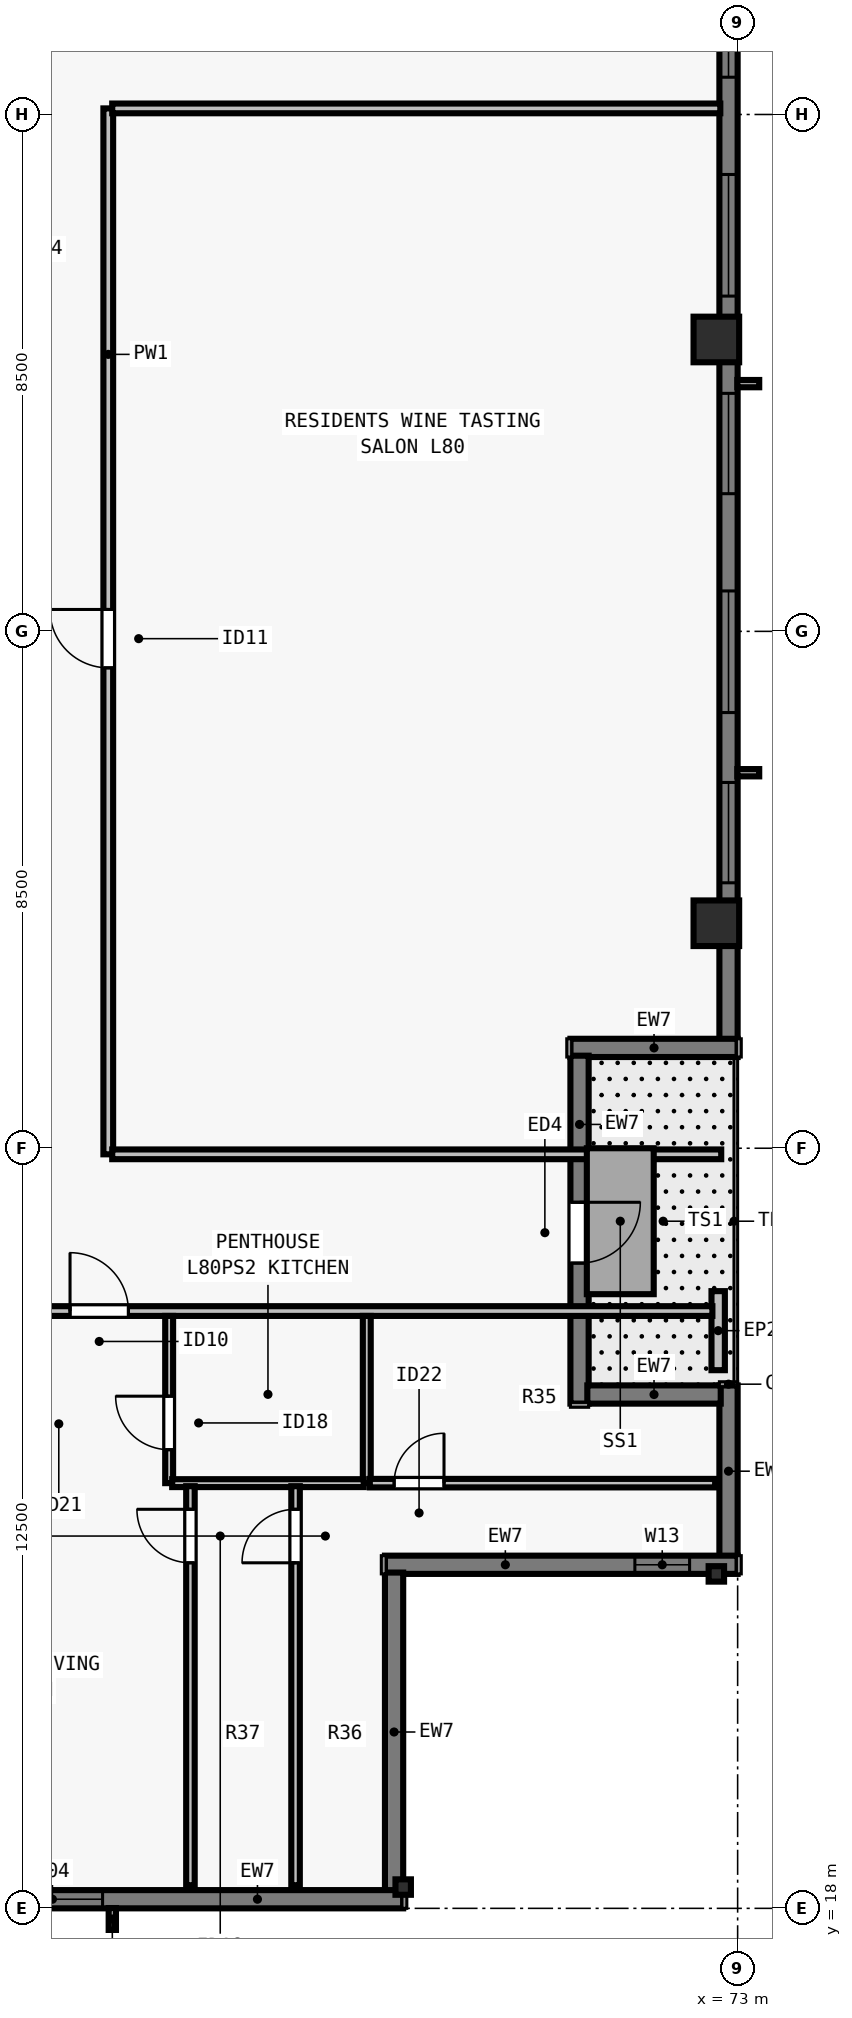
"""IFC4 building model, lengths in metres.
Left out: names, types, materials, properties, quantities, classifications, styles, units other than length and angle.
Written with IfcOpenShell. Run it as: python <this file> out.ifc"""

import sys

from ifc_helpers import new_model, si_unit, direction, frame, frame_2d, origin, origin_2d, place, context, subcontext, project, spatial, rectangle, i_section, extrude, element, fill, save


model = new_model("IFC4")
c1 = context("Model", 3, precision=1e-05, world=origin(), true_north=direction((0.0, 1.0)))
c2 = subcontext(c1, "Body", "Model", "MODEL_VIEW")
j1 = project(units=[si_unit("LENGTHUNIT", "METRE"), si_unit("PLANEANGLEUNIT", "RADIAN")], contexts=[c1])
p1 = place(None, origin())
s1 = spatial("IfcSite", under=j1, at=p1, CompositionType="ELEMENT")
p2 = place(p1, origin())
s2 = spatial("IfcBuilding", under=s1, at=p2, CompositionType="ELEMENT")
p3 = place(p2, frame((0.0, 0.0, 291.0)))
s3 = spatial("IfcBuildingStorey", under=s2, at=p3, CompositionType="ELEMENT", Elevation=291.0)
for number, where, z_axis, x_axis in (
    (1, (67.5, 18.35, 0.0), (0.0, 0.0, 1.0), (1.0, 0.0, 0.0)),
    (2, (72.65, 23.5, 0.0), (0.0, 0.0, 1.0), (0.0, 1.0, 0.0)),
):
    element("IfcColumn", number, at=place(p3, frame(where, z_axis=z_axis, x_axis=x_axis)), inside=s3, PredefinedType="COLUMN", context=c2, shape_type="SweptSolid", body=[
        extrude(i_section(OverallWidth=0.254, OverallDepth=0.254, WebThickness=0.009, FlangeThickness=0.014, FilletRadius=0.013, at=origin_2d()), origin(), (0.0, 0.0, 1.0), 3.5),
    ])
for number, where, z_axis, x_axis in (
    (3, (72.65, 34.2, 0.0), (0.0, 0.0, 1.0), (0.0, 1.0, 0.0)),
    (4, (72.65, 43.8, 0.0), (0.0, 0.0, 1.0), (0.0, 1.0, 0.0)),
):
    element("IfcColumn", number, at=place(p3, frame(where, z_axis=z_axis, x_axis=x_axis)), inside=s3, PredefinedType="COLUMN", context=c2, shape_type="SweptSolid", body=[
        extrude(rectangle(XDim=0.75, YDim=0.75, at=origin_2d()), origin(), (0.0, 0.0, 1.0), 3.5),
    ])
p4 = place(p3, frame((72.85, 26.6, 0.0), z_axis=(0.0, 0.0, 1.0), x_axis=(0.0, -1.0, 0.0)))
e5 = element("IfcWall", 5, at=p4, inside=s3, PredefinedType="SOLIDWALL", context=c2, shape_type="SweptSolid", body=[
    extrude(rectangle(XDim=2.822, YDim=0.3, at=frame_2d((1.411, 0.0))), origin(), (0.0, 0.0, 1.0), 3.29),
])
p5 = place(p3, frame((73.0, 23.65, 0.0), z_axis=(0.0, 0.0, 1.0), x_axis=(-1.0, 0.0, 0.0)))
e6 = element("IfcWall", 6, at=p5, inside=s3, PredefinedType="SOLIDWALL", context=c2, shape_type="SweptSolid", body=[
    extrude(rectangle(XDim=5.8, YDim=0.3, at=frame_2d((2.9, 0.0))), origin(), (0.0, 0.0, 1.0), 3.29),
])
p6 = place(p5, frame((0.79, 0.0, 0.8)))
e7 = element("IfcOpeningElement", 7, at=p6, cuts=e6, PredefinedType="OPENING", context=c2, shape_type="SweptSolid", body=[
    extrude(rectangle(XDim=0.9, YDim=1.75, at=frame_2d((0.45, 0.875))), frame((0.0, 0.16, 0.0), z_axis=(0.0, -1.0, 0.0), x_axis=(1.0, 0.0, 0.0)), (0.0, 0.0, 1.0), 0.32),
])
p7 = place(p3, frame((67.35, 23.522, 0.0), z_axis=(0.0, 0.0, 1.0), x_axis=(0.0, -1.0, 0.0)))
e8 = element("IfcWall", 8, at=p7, inside=s3, PredefinedType="SOLIDWALL", context=c2, shape_type="SweptSolid", body=[
    extrude(rectangle(XDim=5.244, YDim=0.3, at=frame_2d((2.622, 0.0))), origin(), (0.0, 0.0, 1.0), 3.29),
])
p8 = place(p3, frame((67.5, 18.15, 0.0), z_axis=(0.0, 0.0, 1.0), x_axis=(-1.0, 0.0, 0.0)))
e9 = element("IfcWall", 9, at=p8, inside=s3, PredefinedType="SOLIDWALL", context=c2, shape_type="SweptSolid", body=[
    extrude(rectangle(XDim=30.722, YDim=0.3, at=frame_2d((15.361, 0.0))), origin(), (0.0, 0.0, 1.0), 3.29),
])
p9 = place(p8, frame((4.944, 0.0, 0.8)))
e10 = element("IfcOpeningElement", 10, at=p9, cuts=e9, PredefinedType="OPENING", context=c2, shape_type="SweptSolid", body=[
    extrude(rectangle(XDim=1.65, YDim=1.758, at=frame_2d((0.825, 0.879))), frame((0.0, 0.16, 0.0), z_axis=(0.0, -1.0, 0.0), x_axis=(1.0, 0.0, 0.0)), (0.0, 0.0, 1.0), 0.32),
])
p10 = place(p8, frame((7.756, 0.0, 0.8)))
e11 = element("IfcOpeningElement", 11, at=p10, cuts=e9, PredefinedType="OPENING", context=c2, shape_type="SweptSolid", body=[
    extrude(rectangle(XDim=2.0, YDim=1.758, at=frame_2d((1.0, 0.879))), frame((0.0, 0.16, 0.0), z_axis=(0.0, -1.0, 0.0), x_axis=(1.0, 0.0, 0.0)), (0.0, 0.0, 1.0), 0.32),
])
p11 = place(p8, frame((12.617, 0.0, 0.8)))
e12 = element("IfcOpeningElement", 12, at=p11, cuts=e9, PredefinedType="OPENING", context=c2, shape_type="SweptSolid", body=[
    extrude(rectangle(XDim=1.65, YDim=1.758, at=frame_2d((0.825, 0.879))), frame((0.0, 0.16, 0.0), z_axis=(0.0, -1.0, 0.0), x_axis=(1.0, 0.0, 0.0)), (0.0, 0.0, 1.0), 0.32),
])
p12 = place(p8, frame((16.28, 0.0, 0.8)))
e13 = element("IfcOpeningElement", 13, at=p12, cuts=e9, PredefinedType="OPENING", context=c2, shape_type="SweptSolid", body=[
    extrude(rectangle(XDim=2.0, YDim=1.758, at=frame_2d((1.0, 0.879))), frame((0.0, 0.16, 0.0), z_axis=(0.0, -1.0, 0.0), x_axis=(1.0, 0.0, 0.0)), (0.0, 0.0, 1.0), 0.32),
])
p13 = place(p8, frame((21.142, 0.0, 0.8)))
e14 = element("IfcOpeningElement", 14, at=p13, cuts=e9, PredefinedType="OPENING", context=c2, shape_type="SweptSolid", body=[
    extrude(rectangle(XDim=1.65, YDim=1.758, at=frame_2d((0.825, 0.879))), frame((0.0, 0.16, 0.0), z_axis=(0.0, -1.0, 0.0), x_axis=(1.0, 0.0, 0.0)), (0.0, 0.0, 1.0), 0.32),
])
p14 = place(p8, frame((23.954, 0.0, 0.8)))
e15 = element("IfcOpeningElement", 15, at=p14, cuts=e9, PredefinedType="OPENING", context=c2, shape_type="SweptSolid", body=[
    extrude(rectangle(XDim=2.0, YDim=1.758, at=frame_2d((1.0, 0.879))), frame((0.0, 0.16, 0.0), z_axis=(0.0, -1.0, 0.0), x_axis=(1.0, 0.0, 0.0)), (0.0, 0.0, 1.0), 0.32),
])
p15 = place(p3, frame((72.85, 54.5, 0.0), z_axis=(0.0, 0.0, 1.0), x_axis=(0.0, -1.0, 0.0)))
e16 = element("IfcWall", 16, at=p15, inside=s3, PredefinedType="SOLIDWALL", context=c2, shape_type="SweptSolid", body=[
    extrude(rectangle(XDim=22.222, YDim=0.3, at=frame_2d((11.111, 0.0))), origin(), (0.0, 0.0, 1.0), 3.29),
])
p16 = place(p15, frame((4.737, 0.0, 0.8)))
e17 = element("IfcOpeningElement", 17, at=p16, cuts=e16, PredefinedType="OPENING", context=c2, shape_type="SweptSolid", body=[
    extrude(rectangle(XDim=1.65, YDim=1.758, at=frame_2d((0.825, 0.879))), frame((0.0, 0.16, 0.0), z_axis=(0.0, -1.0, 0.0), x_axis=(1.0, 0.0, 0.0)), (0.0, 0.0, 1.0), 0.32),
])
p17 = place(p15, frame((7.987, 0.0, 0.8)))
e18 = element("IfcOpeningElement", 18, at=p17, cuts=e16, PredefinedType="OPENING", context=c2, shape_type="SweptSolid", body=[
    extrude(rectangle(XDim=2.0, YDim=1.758, at=frame_2d((1.0, 0.879))), frame((0.0, 0.16, 0.0), z_axis=(0.0, -1.0, 0.0), x_axis=(1.0, 0.0, 0.0)), (0.0, 0.0, 1.0), 0.32),
])
p18 = place(p15, frame((11.586, 0.0, 0.8)))
e19 = element("IfcOpeningElement", 19, at=p18, cuts=e16, PredefinedType="OPENING", context=c2, shape_type="SweptSolid", body=[
    extrude(rectangle(XDim=1.65, YDim=1.758, at=frame_2d((0.825, 0.879))), frame((0.0, 0.16, 0.0), z_axis=(0.0, -1.0, 0.0), x_axis=(1.0, 0.0, 0.0)), (0.0, 0.0, 1.0), 0.32),
])
p19 = place(p15, frame((14.835, 0.0, 0.8)))
e20 = element("IfcOpeningElement", 20, at=p19, cuts=e16, PredefinedType="OPENING", context=c2, shape_type="SweptSolid", body=[
    extrude(rectangle(XDim=2.0, YDim=1.758, at=frame_2d((1.0, 0.879))), frame((0.0, 0.16, 0.0), z_axis=(0.0, -1.0, 0.0), x_axis=(1.0, 0.0, 0.0)), (0.0, 0.0, 1.0), 0.32),
])
p20 = place(p15, frame((17.985, 0.0, 0.8)))
e21 = element("IfcOpeningElement", 21, at=p20, cuts=e16, PredefinedType="OPENING", context=c2, shape_type="SweptSolid", body=[
    extrude(rectangle(XDim=1.65, YDim=1.758, at=frame_2d((0.825, 0.879))), frame((0.0, 0.16, 0.0), z_axis=(0.0, -1.0, 0.0), x_axis=(1.0, 0.0, 0.0)), (0.0, 0.0, 1.0), 0.32),
])
p21 = place(p3, frame((73.0, 32.15, 0.0), z_axis=(0.0, 0.0, 1.0), x_axis=(-1.0, 0.0, 0.0)))
e22 = element("IfcWall", 22, at=p21, inside=s3, PredefinedType="SOLIDWALL", context=c2, shape_type="SweptSolid", body=[
    extrude(rectangle(XDim=2.75, YDim=0.3, at=frame_2d((1.375, 0.0))), origin(), (0.0, 0.0, 1.0), 3.29),
])
p22 = place(p3, frame((70.4, 32.022, 0.0), z_axis=(0.0, 0.0, 1.0), x_axis=(0.0, -1.0, 0.0)))
e23 = element("IfcWall", 23, at=p22, inside=s3, PredefinedType="SOLIDWALL", context=c2, shape_type="SweptSolid", body=[
    extrude(rectangle(XDim=5.722, YDim=0.3, at=frame_2d((2.861, 0.0))), origin(), (0.0, 0.0, 1.0), 3.29),
])
p23 = place(p22, frame((2.411, 0.0, 0.0)))
e24 = element("IfcOpeningElement", 24, at=p23, cuts=e23, PredefinedType="OPENING", context=c2, shape_type="SweptSolid", body=[
    extrude(rectangle(XDim=1.0, YDim=2.15, at=frame_2d((0.5, 1.075))), frame((0.0, 0.16, 0.0), z_axis=(0.0, -1.0, 0.0), x_axis=(1.0, 0.0, 0.0)), (0.0, 0.0, 1.0), 0.32),
])
p24 = place(p3, frame((70.528, 26.45, 0.0), z_axis=(0.0, 0.0, 1.0), x_axis=(1.0, 0.0, 0.0)))
e25 = element("IfcWall", 25, at=p24, inside=s3, PredefinedType="SOLIDWALL", context=c2, shape_type="SweptSolid", body=[
    extrude(rectangle(XDim=2.194, YDim=0.3, at=frame_2d((1.097, 0.0))), origin(), (0.0, 0.0, 1.0), 3.29),
])
p25 = place(p3, frame((72.68, 26.85, 0.0), z_axis=(0.0, 0.0, 1.0), x_axis=(0.0, 1.0, 0.0)))
e26 = element("IfcWall", 26, at=p25, inside=s3, PredefinedType="PARAPET", context=c2, shape_type="SweptSolid", body=[
    extrude(rectangle(XDim=1.3, YDim=0.22, at=frame_2d((0.65, 0.0))), origin(), (0.0, 0.0, 1.0), 0.55),
])
p26 = place(p3, frame((31.285, 27.823, 0.0), z_axis=(0.0, 0.0, 1.0), x_axis=(1.0, 0.0, 0.0)))
e27 = element("IfcWall", 27, at=p26, inside=s3, PredefinedType="PARTITIONING", context=c2, shape_type="SweptSolid", body=[
    extrude(rectangle(XDim=41.3, YDim=0.16, at=frame_2d((20.65, 0.0))), origin(), (0.0, 0.0, 1.0), 3.009),
])
p27 = place(p26, frame((10.156, 0.0, 0.0)))
e28 = element("IfcOpeningElement", 28, at=p27, cuts=e27, PredefinedType="OPENING", context=c2, shape_type="SweptSolid", body=[
    extrude(rectangle(XDim=0.96, YDim=2.18, at=frame_2d((0.48, 1.09))), frame((0.0, 0.09, 0.0), z_axis=(0.0, -1.0, 0.0), x_axis=(1.0, 0.0, 0.0)), (0.0, 0.0, 1.0), 0.18),
])
p28 = place(p26, frame((30.736, 0.0, 0.0)))
e29 = element("IfcOpeningElement", 29, at=p28, cuts=e27, PredefinedType="OPENING", context=c2, shape_type="SweptSolid", body=[
    extrude(rectangle(XDim=0.96, YDim=2.18, at=frame_2d((0.48, 1.09))), frame((0.0, 0.09, 0.0), z_axis=(0.0, -1.0, 0.0), x_axis=(1.0, 0.0, 0.0)), (0.0, 0.0, 1.0), 0.18),
])
p29 = place(p3, frame((62.65, 30.4, 0.0), z_axis=(0.0, 0.0, 1.0), x_axis=(0.0, 1.0, 0.0)))
e30 = element("IfcWall", 30, at=p29, inside=s3, PredefinedType="PARTITIONING", context=c2, shape_type="SweptSolid", body=[
    extrude(rectangle(XDim=17.2, YDim=0.16, at=frame_2d((8.6, 0.0))), origin(), (0.0, 0.0, 1.0), 3.29),
])
p30 = place(p29, frame((8.0, 0.0, 0.0)))
e31 = element("IfcOpeningElement", 31, at=p30, cuts=e30, PredefinedType="OPENING", context=c2, shape_type="SweptSolid", body=[
    extrude(rectangle(XDim=0.96, YDim=2.12, at=frame_2d((0.48, 1.06))), frame((0.0, 0.09, 0.0), z_axis=(0.0, -1.0, 0.0), x_axis=(1.0, 0.0, 0.0)), (0.0, 0.0, 1.0), 0.18),
])
p31 = place(p3, frame((62.715, 30.4, 0.0), z_axis=(0.0, 0.0, 1.0), x_axis=(1.0, 0.0, 0.0)))
e32 = element("IfcWall", 32, at=p31, inside=s3, PredefinedType="PARTITIONING", context=c2, shape_type="SweptSolid", body=[
    extrude(rectangle(XDim=10.015, YDim=0.16, at=frame_2d((5.007, 0.0))), origin(), (0.0, 0.0, 1.0), 3.29),
])
p32 = place(p3, frame((62.715, 47.6, 0.0), z_axis=(0.0, 0.0, 1.0), x_axis=(1.0, 0.0, 0.0)))
e33 = element("IfcWall", 33, at=p32, inside=s3, PredefinedType="PARTITIONING", context=c2, shape_type="SweptSolid", body=[
    extrude(rectangle(XDim=10.0, YDim=0.16, at=frame_2d((5.0, 0.0))), origin(), (0.0, 0.0, 1.0), 3.29),
])
p33 = place(p3, frame((66.901, 24.992, 0.0), z_axis=(0.0, 0.0, 1.0), x_axis=(0.0, 1.0, 0.0)))
e34 = element("IfcWall", 34, at=p33, inside=s3, PredefinedType="PLUMBINGWALL", context=c2, shape_type="SweptSolid", body=[
    extrude(rectangle(XDim=2.75, YDim=0.13, at=frame_2d((1.375, 0.0))), origin(), (0.0, 0.0, 1.0), 3.29),
])
p34 = place(p3, frame((63.651, 24.992, 0.0), z_axis=(0.0, 0.0, 1.0), x_axis=(0.0, 1.0, 0.0)))
e35 = element("IfcWall", 35, at=p34, inside=s3, PredefinedType="PLUMBINGWALL", context=c2, shape_type="SweptSolid", body=[
    extrude(rectangle(XDim=2.75, YDim=0.13, at=frame_2d((1.375, 0.0))), origin(), (0.0, 0.0, 1.0), 2.653),
])
p35 = place(p34, frame((0.55, 0.0, 0.0)))
e36 = element("IfcOpeningElement", 36, at=p35, cuts=e35, PredefinedType="OPENING", context=c2, shape_type="SweptSolid", body=[
    extrude(rectangle(XDim=0.88, YDim=2.1, at=frame_2d((0.44, 1.05))), frame((0.0, 0.075, 0.0), z_axis=(0.0, -1.0, 0.0), x_axis=(1.0, 0.0, 0.0)), (0.0, 0.0, 1.0), 0.15),
])
p36 = place(p3, frame((63.701, 24.992, 0.0), z_axis=(0.0, 0.0, 1.0), x_axis=(1.0, 0.0, 0.0)))
e37 = element("IfcWall", 37, at=p36, inside=s3, PredefinedType="PLUMBINGWALL", context=c2, shape_type="SweptSolid", body=[
    extrude(rectangle(XDim=3.15, YDim=0.13, at=frame_2d((1.575, 0.0))), origin(), (0.0, 0.0, 1.0), 3.29),
])
p37 = place(p3, frame((65.73, 18.38, 0.0), z_axis=(0.0, 0.0, 1.0), x_axis=(0.0, 1.0, 0.0)))
e38 = element("IfcWall", 38, at=p37, inside=s3, PredefinedType="PARTITIONING", context=c2, shape_type="SweptSolid", body=[
    extrude(rectangle(XDim=6.562, YDim=0.14, at=frame_2d((3.281, 0.0))), origin(), (0.0, 0.0, 1.0), 2.653),
])
p38 = place(p37, frame((5.302, 0.0, 0.0)))
e39 = element("IfcOpeningElement", 39, at=p38, cuts=e38, PredefinedType="OPENING", context=c2, shape_type="SweptSolid", body=[
    extrude(rectangle(XDim=0.88, YDim=2.1, at=frame_2d((0.44, 1.05))), frame((0.0, 0.08, 0.0), z_axis=(0.0, -1.0, 0.0), x_axis=(1.0, 0.0, 0.0)), (0.0, 0.0, 1.0), 0.16),
])
p39 = place(p3, frame((66.951, 24.992, 0.0), z_axis=(0.0, 0.0, 1.0), x_axis=(1.0, 0.0, 0.0)))
e40 = element("IfcWall", 40, at=p39, inside=s3, PredefinedType="PARTITIONING", context=c2, shape_type="SweptSolid", body=[
    extrude(rectangle(XDim=5.679, YDim=0.14, at=frame_2d((2.839, 0.0))), origin(), (0.0, 0.0, 1.0), 3.009),
])
p40 = place(p39, frame((0.4, 0.0, 0.0)))
e41 = element("IfcOpeningElement", 41, at=p40, cuts=e40, PredefinedType="OPENING", context=c2, shape_type="SweptSolid", body=[
    extrude(rectangle(XDim=0.82, YDim=2.1, at=frame_2d((0.41, 1.05))), frame((0.0, 0.08, 0.0), z_axis=(0.0, -1.0, 0.0), x_axis=(1.0, 0.0, 0.0)), (0.0, 0.0, 1.0), 0.16),
])
p41 = place(p3, frame((64.001, 18.38, 0.0), z_axis=(0.0, 0.0, 1.0), x_axis=(0.0, 1.0, 0.0)))
e42 = element("IfcWall", 42, at=p41, inside=s3, PredefinedType="PARTITIONING", context=c2, shape_type="SweptSolid", body=[
    extrude(rectangle(XDim=6.562, YDim=0.14, at=frame_2d((3.281, 0.0))), origin(), (0.0, 0.0, 1.0), 2.653),
])
p42 = place(p41, frame((5.302, 0.0, 0.0)))
e43 = element("IfcOpeningElement", 43, at=p42, cuts=e42, PredefinedType="OPENING", context=c2, shape_type="SweptSolid", body=[
    extrude(rectangle(XDim=0.88, YDim=2.1, at=frame_2d((0.44, 1.05))), frame((0.0, 0.08, 0.0), z_axis=(0.0, -1.0, 0.0), x_axis=(1.0, 0.0, 0.0)), (0.0, 0.0, 1.0), 0.16),
])
p43 = place(p9, origin())
e44 = element("IfcWindow", 44, at=p43, inside=s3, PartitioningType="SINGLE_PANEL", PredefinedType="WINDOW", context=c2, shape_type="SweptSolid", body=[
    extrude(rectangle(XDim=1.65, YDim=1.758, at=frame_2d((0.825, 0.879))), frame((0.0, -0.05, 0.0), z_axis=(0.0, -1.0, 0.0), x_axis=(1.0, 0.0, 0.0)), (0.0, 0.0, 1.0), 0.06),
])
fill(e10, e44)
p44 = place(p16, origin())
e45 = element("IfcWindow", 45, at=p44, inside=s3, PartitioningType="SINGLE_PANEL", PredefinedType="WINDOW", context=c2, shape_type="SweptSolid", body=[
    extrude(rectangle(XDim=1.65, YDim=1.758, at=frame_2d((0.825, 0.879))), frame((0.0, -0.05, 0.0), z_axis=(0.0, -1.0, 0.0), x_axis=(1.0, 0.0, 0.0)), (0.0, 0.0, 1.0), 0.06),
])
fill(e17, e45)
p45 = place(p17, origin())
e46 = element("IfcWindow", 46, at=p45, inside=s3, PartitioningType="SINGLE_PANEL", PredefinedType="WINDOW", context=c2, shape_type="SweptSolid", body=[
    extrude(rectangle(XDim=2.0, YDim=1.758, at=frame_2d((1.0, 0.879))), frame((0.0, -0.05, 0.0), z_axis=(0.0, -1.0, 0.0), x_axis=(1.0, 0.0, 0.0)), (0.0, 0.0, 1.0), 0.06),
])
fill(e18, e46)
p46 = place(p18, origin())
e47 = element("IfcWindow", 47, at=p46, inside=s3, PartitioningType="SINGLE_PANEL", PredefinedType="WINDOW", context=c2, shape_type="SweptSolid", body=[
    extrude(rectangle(XDim=1.65, YDim=1.758, at=frame_2d((0.825, 0.879))), frame((0.0, -0.05, 0.0), z_axis=(0.0, -1.0, 0.0), x_axis=(1.0, 0.0, 0.0)), (0.0, 0.0, 1.0), 0.06),
])
fill(e19, e47)
p47 = place(p19, origin())
e48 = element("IfcWindow", 48, at=p47, inside=s3, PartitioningType="SINGLE_PANEL", PredefinedType="WINDOW", context=c2, shape_type="SweptSolid", body=[
    extrude(rectangle(XDim=2.0, YDim=1.758, at=frame_2d((1.0, 0.879))), frame((0.0, -0.05, 0.0), z_axis=(0.0, -1.0, 0.0), x_axis=(1.0, 0.0, 0.0)), (0.0, 0.0, 1.0), 0.06),
])
fill(e20, e48)
p48 = place(p20, origin())
e49 = element("IfcWindow", 49, at=p48, inside=s3, PartitioningType="SINGLE_PANEL", PredefinedType="WINDOW", context=c2, shape_type="SweptSolid", body=[
    extrude(rectangle(XDim=1.65, YDim=1.758, at=frame_2d((0.825, 0.879))), frame((0.0, -0.05, 0.0), z_axis=(0.0, -1.0, 0.0), x_axis=(1.0, 0.0, 0.0)), (0.0, 0.0, 1.0), 0.06),
])
fill(e21, e49)
p49 = place(p23, origin())
e50 = element("IfcDoor", 50, at=p49, inside=s3, OperationType="SINGLE_SWING_LEFT", PredefinedType="DOOR", context=c2, shape_type="SweptSolid", body=[
    extrude(rectangle(XDim=1.0, YDim=2.15, at=frame_2d((0.5, 1.075))), frame((0.0, 0.025, 0.0), z_axis=(0.0, -1.0, 0.0), x_axis=(1.0, 0.0, 0.0)), (0.0, 0.0, 1.0), 0.05),
])
fill(e24, e50)
p50 = place(p6, origin())
e51 = element("IfcWindow", 51, at=p50, inside=s3, PartitioningType="SINGLE_PANEL", PredefinedType="WINDOW", context=c2, shape_type="SweptSolid", body=[
    extrude(rectangle(XDim=0.9, YDim=1.75, at=frame_2d((0.45, 0.875))), frame((0.0, -0.04, 0.0), z_axis=(0.0, -1.0, 0.0), x_axis=(1.0, 0.0, 0.0)), (0.0, 0.0, 1.0), 0.06),
])
fill(e7, e51)
p51 = place(p35, origin())
e52 = element("IfcDoor", 52, at=p51, inside=s3, OperationType="SINGLE_SWING_RIGHT", PredefinedType="DOOR", context=c2, shape_type="SweptSolid", body=[
    extrude(rectangle(XDim=0.88, YDim=2.1, at=frame_2d((0.44, 1.05))), frame((0.0, 0.025, 0.0), z_axis=(0.0, -1.0, 0.0), x_axis=(1.0, 0.0, 0.0)), (0.0, 0.0, 1.0), 0.05),
])
fill(e36, e52)
p52 = place(p40, origin())
e53 = element("IfcDoor", 53, at=p52, inside=s3, OperationType="SINGLE_SWING_RIGHT", PredefinedType="DOOR", context=c2, shape_type="SweptSolid", body=[
    extrude(rectangle(XDim=0.82, YDim=2.1, at=frame_2d((0.41, 1.05))), frame((0.0, 0.025, 0.0), z_axis=(0.0, -1.0, 0.0), x_axis=(1.0, 0.0, 0.0)), (0.0, 0.0, 1.0), 0.05),
])
fill(e41, e53)
p53 = place(p38, origin())
e54 = element("IfcDoor", 54, at=p53, inside=s3, OperationType="SINGLE_SWING_LEFT", PredefinedType="DOOR", context=c2, shape_type="SweptSolid", body=[
    extrude(rectangle(XDim=0.88, YDim=2.1, at=frame_2d((0.44, 1.05))), frame((0.0, 0.025, 0.0), z_axis=(0.0, -1.0, 0.0), x_axis=(1.0, 0.0, 0.0)), (0.0, 0.0, 1.0), 0.05),
])
fill(e39, e54)
p54 = place(p42, origin())
e55 = element("IfcDoor", 55, at=p54, inside=s3, OperationType="SINGLE_SWING_RIGHT", PredefinedType="DOOR", context=c2, shape_type="SweptSolid", body=[
    extrude(rectangle(XDim=0.88, YDim=2.1, at=frame_2d((0.44, 1.05))), frame((0.0, 0.025, 0.0), z_axis=(0.0, -1.0, 0.0), x_axis=(1.0, 0.0, 0.0)), (0.0, 0.0, 1.0), 0.05),
])
fill(e43, e55)
p55 = place(p28, origin())
e56 = element("IfcDoor", 56, at=p55, inside=s3, OperationType="SINGLE_SWING_LEFT", PredefinedType="DOOR", context=c2, shape_type="SweptSolid", body=[
    extrude(rectangle(XDim=0.96, YDim=2.18, at=frame_2d((0.48, 1.09))), frame((0.0, 0.025, 0.0), z_axis=(0.0, -1.0, 0.0), x_axis=(1.0, 0.0, 0.0)), (0.0, 0.0, 1.0), 0.05),
])
fill(e29, e56)
p56 = place(p30, origin())
e57 = element("IfcDoor", 57, at=p56, inside=s3, OperationType="SINGLE_SWING_RIGHT", PredefinedType="DOOR", context=c2, shape_type="SweptSolid", body=[
    extrude(rectangle(XDim=0.96, YDim=2.12, at=frame_2d((0.48, 1.06))), frame((0.0, 0.025, 0.0), z_axis=(0.0, -1.0, 0.0), x_axis=(1.0, 0.0, 0.0)), (0.0, 0.0, 1.0), 0.05),
])
fill(e31, e57)
save(model, sys.argv[1])
